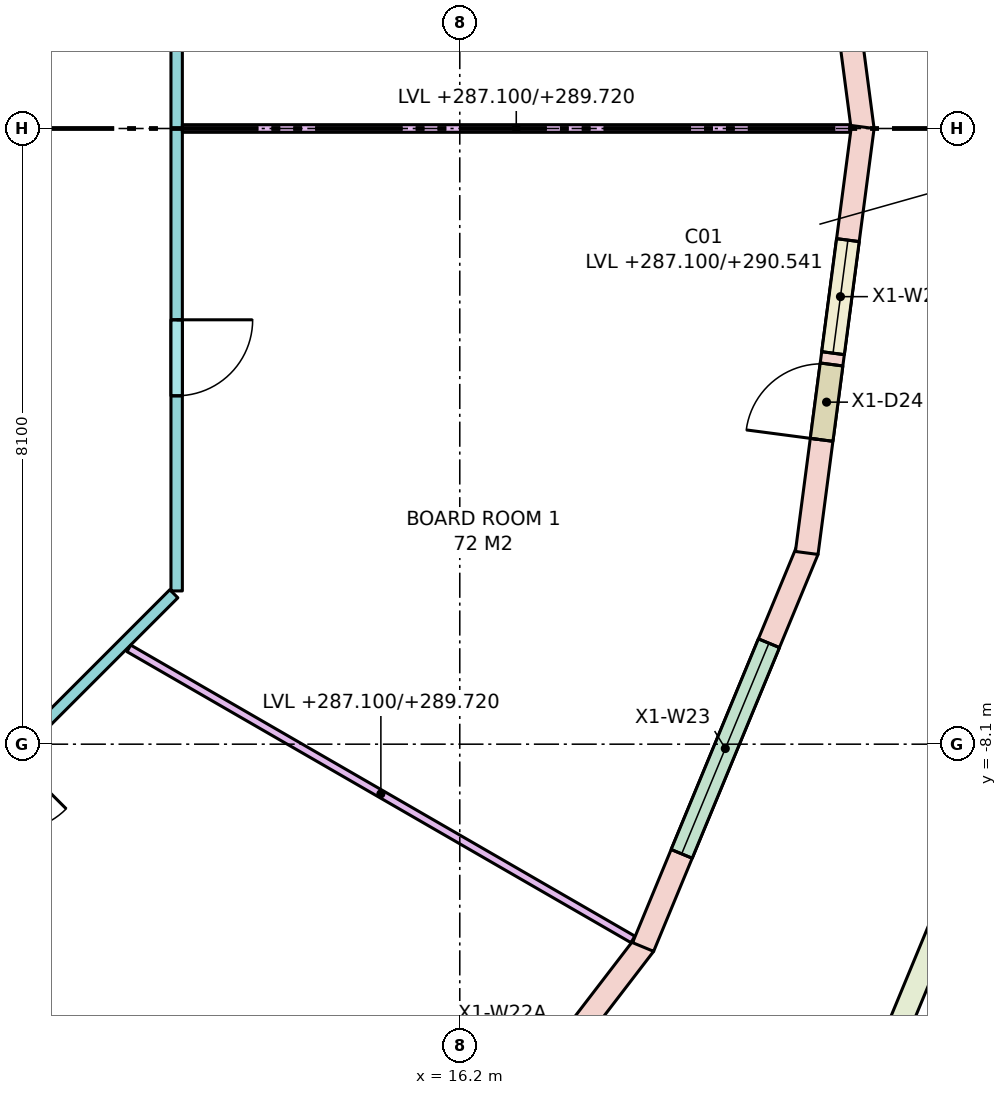
"""IFC4 building model, lengths in metres.
Left out: names, types, materials, properties, quantities, classifications, styles, units other than length and angle.
Written with IfcOpenShell. Run it as: python <this file> out.ifc"""

import sys

from ifc_helpers import new_model, si_unit, direction, frame, frame_2d, origin, place, context, subcontext, project, spatial, rectangle, extrude, element, fill, save


model = new_model("IFC4")
c1 = context("Model", 3, precision=1e-05, world=origin(), true_north=direction((0.0, 1.0)))
c2 = subcontext(c1, "Body", "Model", "MODEL_VIEW")
j1 = project(units=[si_unit("LENGTHUNIT", "METRE"), si_unit("PLANEANGLEUNIT", "RADIAN")], contexts=[c1])
p1 = place(None, origin())
s1 = spatial("IfcSite", under=j1, at=p1, CompositionType="ELEMENT")
p2 = place(p1, origin())
s2 = spatial("IfcBuilding", under=s1, at=p2, CompositionType="ELEMENT")
p3 = place(p2, frame((0.0, 0.0, 287.1)))
s3 = spatial("IfcBuildingStorey", under=s2, at=p3, CompositionType="ELEMENT", Elevation=287.1)
p4 = place(p3, frame((21.503, -0.02, 0.0), z_axis=(0.0, 0.0, 1.0), x_axis=(-0.130533844229, 0.991443853938, 0.0)))
e1 = element("IfcWall", 1, at=p4, inside=s3, PredefinedType="STANDARD", context=c2, shape_type="SweptSolid", body=[
    extrude(rectangle(XDim=5.652, YDim=0.3, at=frame_2d((2.826, 0.0))), origin(), (0.0, 0.0, 1.0), 3.42),
])
p5 = place(p4, frame((1.326, 0.0, 0.8)))
e2 = element("IfcOpeningElement", 2, at=p5, cuts=e1, PredefinedType="OPENING", context=c2, shape_type="SweptSolid", body=[
    extrude(rectangle(XDim=3.0, YDim=2.4, at=frame_2d((1.5, 1.2))), frame((0.0, 0.16, 0.0), z_axis=(0.0, -1.0, 0.0), x_axis=(1.0, 0.0, 0.0)), (0.0, 0.0, 1.0), 0.32),
])
p6 = place(p3, frame((15.191, -15.219, 0.0), z_axis=(0.0, 0.0, 1.0), x_axis=(0.608747976925, 0.793363662257, 0.0)))
e3 = element("IfcWall", 3, at=p6, inside=s3, PredefinedType="STANDARD", context=c2, shape_type="SweptSolid", body=[
    extrude(rectangle(XDim=5.652, YDim=0.3, at=frame_2d((2.826, 0.0))), origin(), (0.0, 0.0, 1.0), 3.42),
])
p7 = place(p6, frame((1.501, 0.0, 0.0)))
e4 = element("IfcOpeningElement", 4, at=p7, cuts=e3, PredefinedType="OPENING", context=c2, shape_type="SweptSolid", body=[
    extrude(rectangle(XDim=1.0, YDim=2.4, at=frame_2d((0.5, 1.2))), frame((0.0, 0.16, 0.0), z_axis=(0.0, -1.0, 0.0), x_axis=(1.0, 0.0, 0.0)), (0.0, 0.0, 1.0), 0.32),
])
p8 = place(p6, frame((2.651, 0.0, 0.8)))
e5 = element("IfcOpeningElement", 5, at=p8, cuts=e3, PredefinedType="OPENING", context=c2, shape_type="SweptSolid", body=[
    extrude(rectangle(XDim=1.5, YDim=2.4, at=frame_2d((0.75, 1.2))), frame((0.0, 0.16, 0.0), z_axis=(0.0, -1.0, 0.0), x_axis=(1.0, 0.0, 0.0)), (0.0, 0.0, 1.0), 0.32),
])
p9 = place(p3, frame((18.612, -10.768, 0.0), z_axis=(0.0, 0.0, 1.0), x_axis=(0.382660798975, 0.923888907244, 0.0)))
e6 = element("IfcWall", 6, at=p9, inside=s3, PredefinedType="STANDARD", context=c2, shape_type="SweptSolid", body=[
    extrude(rectangle(XDim=5.652, YDim=0.3, at=frame_2d((2.826, 0.0))), origin(), (0.0, 0.0, 1.0), 3.42),
])
p10 = place(p9, frame((1.326, 0.0, 0.8)))
e7 = element("IfcOpeningElement", 7, at=p10, cuts=e6, PredefinedType="OPENING", context=c2, shape_type="SweptSolid", body=[
    extrude(rectangle(XDim=3.0, YDim=2.4, at=frame_2d((1.5, 1.2))), frame((0.0, 0.16, 0.0), z_axis=(0.0, -1.0, 0.0), x_axis=(1.0, 0.0, 0.0)), (0.0, 0.0, 1.0), 0.32),
])
p11 = place(p3, frame((20.765, -5.584, 0.0), z_axis=(0.0, 0.0, 1.0), x_axis=(0.130533844229, 0.991443853938, 0.0)))
e8 = element("IfcWall", 8, at=p11, inside=s3, PredefinedType="STANDARD", context=c2, shape_type="SweptSolid", body=[
    extrude(rectangle(XDim=5.652, YDim=0.3, at=frame_2d((2.826, 0.0))), origin(), (0.0, 0.0, 1.0), 3.42),
])
p12 = place(p11, frame((1.501, 0.0, 0.0)))
e9 = element("IfcOpeningElement", 9, at=p12, cuts=e8, PredefinedType="OPENING", context=c2, shape_type="SweptSolid", body=[
    extrude(rectangle(XDim=1.0, YDim=2.4, at=frame_2d((0.5, 1.2))), frame((0.0, 0.16, 0.0), z_axis=(0.0, -1.0, 0.0), x_axis=(1.0, 0.0, 0.0)), (0.0, 0.0, 1.0), 0.32),
])
p13 = place(p11, frame((2.651, 0.0, 0.8)))
e10 = element("IfcOpeningElement", 10, at=p13, cuts=e8, PredefinedType="OPENING", context=c2, shape_type="SweptSolid", body=[
    extrude(rectangle(XDim=1.5, YDim=2.4, at=frame_2d((0.75, 1.2))), frame((0.0, 0.16, 0.0), z_axis=(0.0, -1.0, 0.0), x_axis=(1.0, 0.0, 0.0)), (0.0, 0.0, 1.0), 0.32),
])
p14 = place(p3, frame((12.438, -6.121, 0.0), z_axis=(0.0, 0.0, 1.0), x_axis=(-0.707106781187, -0.707106781187, 0.0)))
e11 = element("IfcWall", 11, at=p14, inside=s3, PredefinedType="PARTITIONING", context=c2, shape_type="SweptSolid", body=[
    extrude(rectangle(XDim=6.105, YDim=0.15, at=frame_2d((3.053, 0.0))), origin(), (0.0, 0.0, 1.0), 2.57),
])
p15 = place(p14, frame((3.002, 0.0, 0.0)))
e12 = element("IfcOpeningElement", 12, at=p15, cuts=e11, PredefinedType="OPENING", context=c2, shape_type="SweptSolid", body=[
    extrude(rectangle(XDim=1.0, YDim=2.1, at=frame_2d((0.5, 1.05))), frame((0.0, 0.085, 0.0), z_axis=(0.0, -1.0, 0.0), x_axis=(1.0, 0.0, 0.0)), (0.0, 0.0, 1.0), 0.17),
])
p16 = place(p3, frame((12.475, 6.084, 0.0), z_axis=(0.0, 0.0, 1.0), x_axis=(0.0, -1.0, 0.0)))
e13 = element("IfcWall", 13, at=p16, inside=s3, PredefinedType="PARTITIONING", context=c2, shape_type="SweptSolid", body=[
    extrude(rectangle(XDim=12.167, YDim=0.15, at=frame_2d((6.084, 0.0))), origin(), (0.0, 0.0, 1.0), 2.92),
])
p17 = place(p16, frame((8.601, 0.0, 0.0)))
e14 = element("IfcOpeningElement", 14, at=p17, cuts=e13, PredefinedType="OPENING", context=c2, shape_type="SweptSolid", body=[
    extrude(rectangle(XDim=1.0, YDim=2.1, at=frame_2d((0.5, 1.05))), frame((0.0, 0.085, 0.0), z_axis=(0.0, -1.0, 0.0), x_axis=(1.0, 0.0, 0.0)), (0.0, 0.0, 1.0), 0.17),
])
p18 = place(p16, frame((2.167, 0.0, 0.0)))
e15 = element("IfcOpeningElement", 15, at=p18, cuts=e13, PredefinedType="OPENING", context=c2, shape_type="SweptSolid", body=[
    extrude(rectangle(XDim=1.8, YDim=2.1, at=frame_2d((0.9, 1.05))), frame((0.0, 0.085, 0.0), z_axis=(0.0, -1.0, 0.0), x_axis=(1.0, 0.0, 0.0)), (0.0, 0.0, 1.0), 0.17),
])
p19 = place(p3, frame((12.55, 0.0, 0.0), z_axis=(0.0, 0.0, 1.0), x_axis=(1.0, 0.0, 0.0)))
e16 = element("IfcWall", 16, at=p19, inside=s3, PredefinedType="PARTITIONING", context=c2, shape_type="SweptSolid", body=[
    extrude(rectangle(XDim=8.787, YDim=0.1, at=frame_2d((4.393, 0.0))), origin(), (0.0, 0.0, 1.0), 2.62),
])
p20 = place(p3, frame((11.846, -6.839, 0.0), z_axis=(0.0, 0.0, 1.0), x_axis=(0.866007734672, -0.500030602552, 0.0)))
e17 = element("IfcWall", 17, at=p20, inside=s3, PredefinedType="PARTITIONING", context=c2, shape_type="SweptSolid", body=[
    extrude(rectangle(XDim=7.658, YDim=0.1, at=frame_2d((3.829, 0.0))), origin(), (0.0, 0.0, 1.0), 2.62),
])
p21 = place(p10, origin())
e18 = element("IfcWindow", 18, at=p21, inside=s3, PartitioningType="SINGLE_PANEL", PredefinedType="WINDOW", context=c2, shape_type="SweptSolid", body=[
    extrude(rectangle(XDim=3.0, YDim=2.4, at=frame_2d((1.5, 1.2))), frame((0.0, 0.03, 0.0), z_axis=(0.0, -1.0, 0.0), x_axis=(1.0, 0.0, 0.0)), (0.0, 0.0, 1.0), 0.06),
])
fill(e7, e18)
p22 = place(p12, origin())
e19 = element("IfcDoor", 19, at=p22, inside=s3, OperationType="SINGLE_SWING_LEFT", PredefinedType="DOOR", context=c2, shape_type="SweptSolid", body=[
    extrude(rectangle(XDim=1.0, YDim=2.4, at=frame_2d((0.5, 1.2))), frame((0.0, 0.025, 0.0), z_axis=(0.0, -1.0, 0.0), x_axis=(1.0, 0.0, 0.0)), (0.0, 0.0, 1.0), 0.05),
])
fill(e9, e19)
p23 = place(p13, origin())
e20 = element("IfcWindow", 20, at=p23, inside=s3, PartitioningType="SINGLE_PANEL", PredefinedType="WINDOW", context=c2, shape_type="SweptSolid", body=[
    extrude(rectangle(XDim=1.5, YDim=2.4, at=frame_2d((0.75, 1.2))), frame((0.0, 0.03, 0.0), z_axis=(0.0, -1.0, 0.0), x_axis=(1.0, 0.0, 0.0)), (0.0, 0.0, 1.0), 0.06),
])
fill(e10, e20)
p24 = place(p17, origin())
e21 = element("IfcDoor", 21, at=p24, inside=s3, OperationType="SINGLE_SWING_LEFT", PredefinedType="DOOR", context=c2, shape_type="SweptSolid", body=[
    extrude(rectangle(XDim=1.0, YDim=2.1, at=frame_2d((0.5, 1.05))), frame((0.0, 0.025, 0.0), z_axis=(0.0, -1.0, 0.0), x_axis=(1.0, 0.0, 0.0)), (0.0, 0.0, 1.0), 0.05),
])
fill(e14, e21)
save(model, sys.argv[1])
